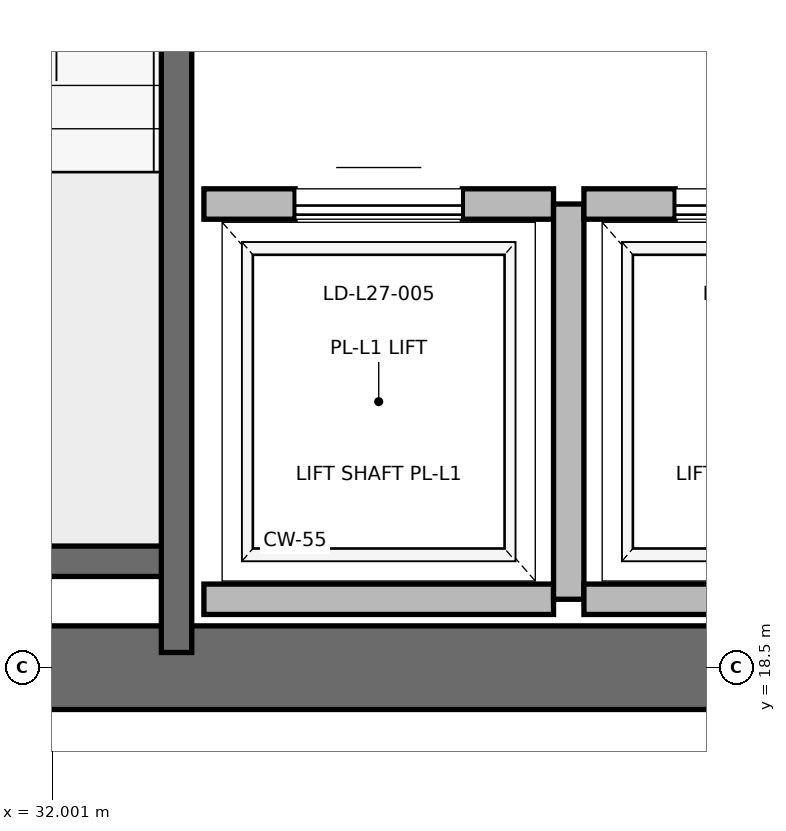
"""IFC4 building model, lengths in metres.
Left out: names, types, materials, properties, quantities, classifications, styles, units other than length and angle.
Written with IfcOpenShell. Run it as: python <this file> out.ifc"""

import sys

from ifc_helpers import new_model, si_unit, direction, frame, frame_2d, origin, place, context, subcontext, project, spatial, rectangle, extrude, element, fill, save


model = new_model("IFC4")
c1 = context("Model", 3, precision=1e-05, world=origin(), true_north=direction((0.0, 1.0)))
c2 = subcontext(c1, "Body", "Model", "MODEL_VIEW")
j1 = project(units=[si_unit("LENGTHUNIT", "METRE"), si_unit("PLANEANGLEUNIT", "RADIAN")], contexts=[c1])
p1 = place(None, origin())
s1 = spatial("IfcSite", under=j1, at=p1, CompositionType="ELEMENT")
p2 = place(p1, origin())
s2 = spatial("IfcBuilding", under=s1, at=p2, CompositionType="ELEMENT")
p3 = place(p2, frame((0.0, 0.0, 118.4)))
s3 = spatial("IfcBuildingStorey", under=s2, at=p3, CompositionType="ELEMENT", Elevation=118.4)
p4 = place(p3, frame((29.0, 18.5, 0.0), z_axis=(0.0, 0.0, 1.0), x_axis=(1.0, 0.0, 0.0)))
e1 = element("IfcWall", 1, at=p4, inside=s3, PredefinedType="SHEAR", context=c2, shape_type="SweptSolid", body=[
    extrude(rectangle(XDim=9.2, YDim=0.55, at=frame_2d((4.6, 0.0))), origin(), (0.0, 0.0, 1.0), 4.7),
])
p5 = place(p3, frame((29.7, 19.2, 0.0), z_axis=(0.0, 0.0, 1.0), x_axis=(1.0, 0.0, 0.0)))
e2 = element("IfcWall", 2, at=p5, inside=s3, PredefinedType="SOLIDWALL", context=c2, shape_type="SweptSolid", body=[
    extrude(rectangle(XDim=3.12, YDim=0.2, at=frame_2d((1.56, 0.0))), origin(), (0.0, 0.0, 1.0), 4.7),
])
p6 = place(p3, frame((32.82, 18.6, 0.0), z_axis=(0.0, 0.0, 1.0), x_axis=(0.0, 1.0, 0.0)))
e3 = element("IfcWall", 3, at=p6, inside=s3, PredefinedType="SOLIDWALL", context=c2, shape_type="SweptSolid", body=[
    extrude(rectangle(XDim=8.78, YDim=0.2, at=frame_2d((4.39, 0.0))), origin(), (0.0, 0.0, 1.0), 4.7),
])
p7 = place(p3, frame((33.0, 18.95, 0.0), z_axis=(0.0, 0.0, 1.0), x_axis=(1.0, 0.0, 0.0)))
e4 = element("IfcWall", 4, at=p7, inside=s3, PredefinedType="SOLIDWALL", context=c2, shape_type="SweptSolid", body=[
    extrude(rectangle(XDim=2.3, YDim=0.2, at=frame_2d((1.15, 0.0))), origin(), (0.0, 0.0, 1.0), 4.7),
])
p8 = place(p3, frame((35.3, 21.55, 0.0), z_axis=(0.0, 0.0, 1.0), x_axis=(-1.0, 0.0, 0.0)))
e5 = element("IfcWall", 5, at=p8, inside=s3, PredefinedType="SOLIDWALL", context=c2, shape_type="SweptSolid", body=[
    extrude(rectangle(XDim=2.3, YDim=0.2, at=frame_2d((1.15, 0.0))), origin(), (0.0, 0.0, 1.0), 4.7),
])
p9 = place(p8, frame((0.6, 0.0, 0.0)))
e6 = element("IfcOpeningElement", 6, at=p9, cuts=e5, PredefinedType="OPENING", context=c2, shape_type="SweptSolid", body=[
    extrude(rectangle(XDim=1.1, YDim=2.2, at=frame_2d((0.55, 1.1))), frame((0.0, 0.1, 0.0), z_axis=(0.0, -1.0, 0.0), x_axis=(1.0, 0.0, 0.0)), (0.0, 0.0, 1.0), 0.2),
])
p10 = place(p3, frame((35.4, 18.95, 0.0), z_axis=(0.0, 0.0, 1.0), x_axis=(0.0, 1.0, 0.0)))
e7 = element("IfcWall", 7, at=p10, inside=s3, PredefinedType="SOLIDWALL", context=c2, shape_type="SweptSolid", body=[
    extrude(rectangle(XDim=2.6, YDim=0.2, at=frame_2d((1.3, 0.0))), origin(), (0.0, 0.0, 1.0), 4.7),
])
p11 = place(p3, frame((35.5, 18.95, 0.0), z_axis=(0.0, 0.0, 1.0), x_axis=(1.0, 0.0, 0.0)))
e8 = element("IfcWall", 8, at=p11, inside=s3, PredefinedType="SOLIDWALL", context=c2, shape_type="SweptSolid", body=[
    extrude(rectangle(XDim=2.3, YDim=0.2, at=frame_2d((1.15, 0.0))), origin(), (0.0, 0.0, 1.0), 3.68),
])
p12 = place(p3, frame((37.8, 21.55, 0.0), z_axis=(0.0, 0.0, 1.0), x_axis=(-1.0, 0.0, 0.0)))
e9 = element("IfcWall", 9, at=p12, inside=s3, PredefinedType="SOLIDWALL", context=c2, shape_type="SweptSolid", body=[
    extrude(rectangle(XDim=2.3, YDim=0.2, at=frame_2d((1.15, 0.0))), origin(), (0.0, 0.0, 1.0), 4.7),
])
p13 = place(p12, frame((0.6, 0.0, 0.0)))
e10 = element("IfcOpeningElement", 10, at=p13, cuts=e9, PredefinedType="OPENING", context=c2, shape_type="SweptSolid", body=[
    extrude(rectangle(XDim=1.1, YDim=2.2, at=frame_2d((0.55, 1.1))), frame((0.0, 0.1, 0.0), z_axis=(0.0, -1.0, 0.0), x_axis=(1.0, 0.0, 0.0)), (0.0, 0.0, 1.0), 0.2),
])
p14 = place(p9, origin())
e11 = element("IfcDoor", 11, at=p14, inside=s3, OperationType="SLIDING_TO_RIGHT", PredefinedType="DOOR", context=c2, shape_type="SweptSolid", body=[
    extrude(rectangle(XDim=1.1, YDim=2.2, at=frame_2d((0.55, 1.1))), frame((0.0, 0.025, 0.0), z_axis=(0.0, -1.0, 0.0), x_axis=(1.0, 0.0, 0.0)), (0.0, 0.0, 1.0), 0.05),
])
fill(e6, e11)
p15 = place(p13, origin())
e12 = element("IfcDoor", 12, at=p15, inside=s3, OperationType="SLIDING_TO_RIGHT", PredefinedType="DOOR", context=c2, shape_type="SweptSolid", body=[
    extrude(rectangle(XDim=1.1, YDim=2.2, at=frame_2d((0.55, 1.1))), frame((0.0, 0.025, 0.0), z_axis=(0.0, -1.0, 0.0), x_axis=(1.0, 0.0, 0.0)), (0.0, 0.0, 1.0), 0.05),
])
fill(e10, e12)
save(model, sys.argv[1])
